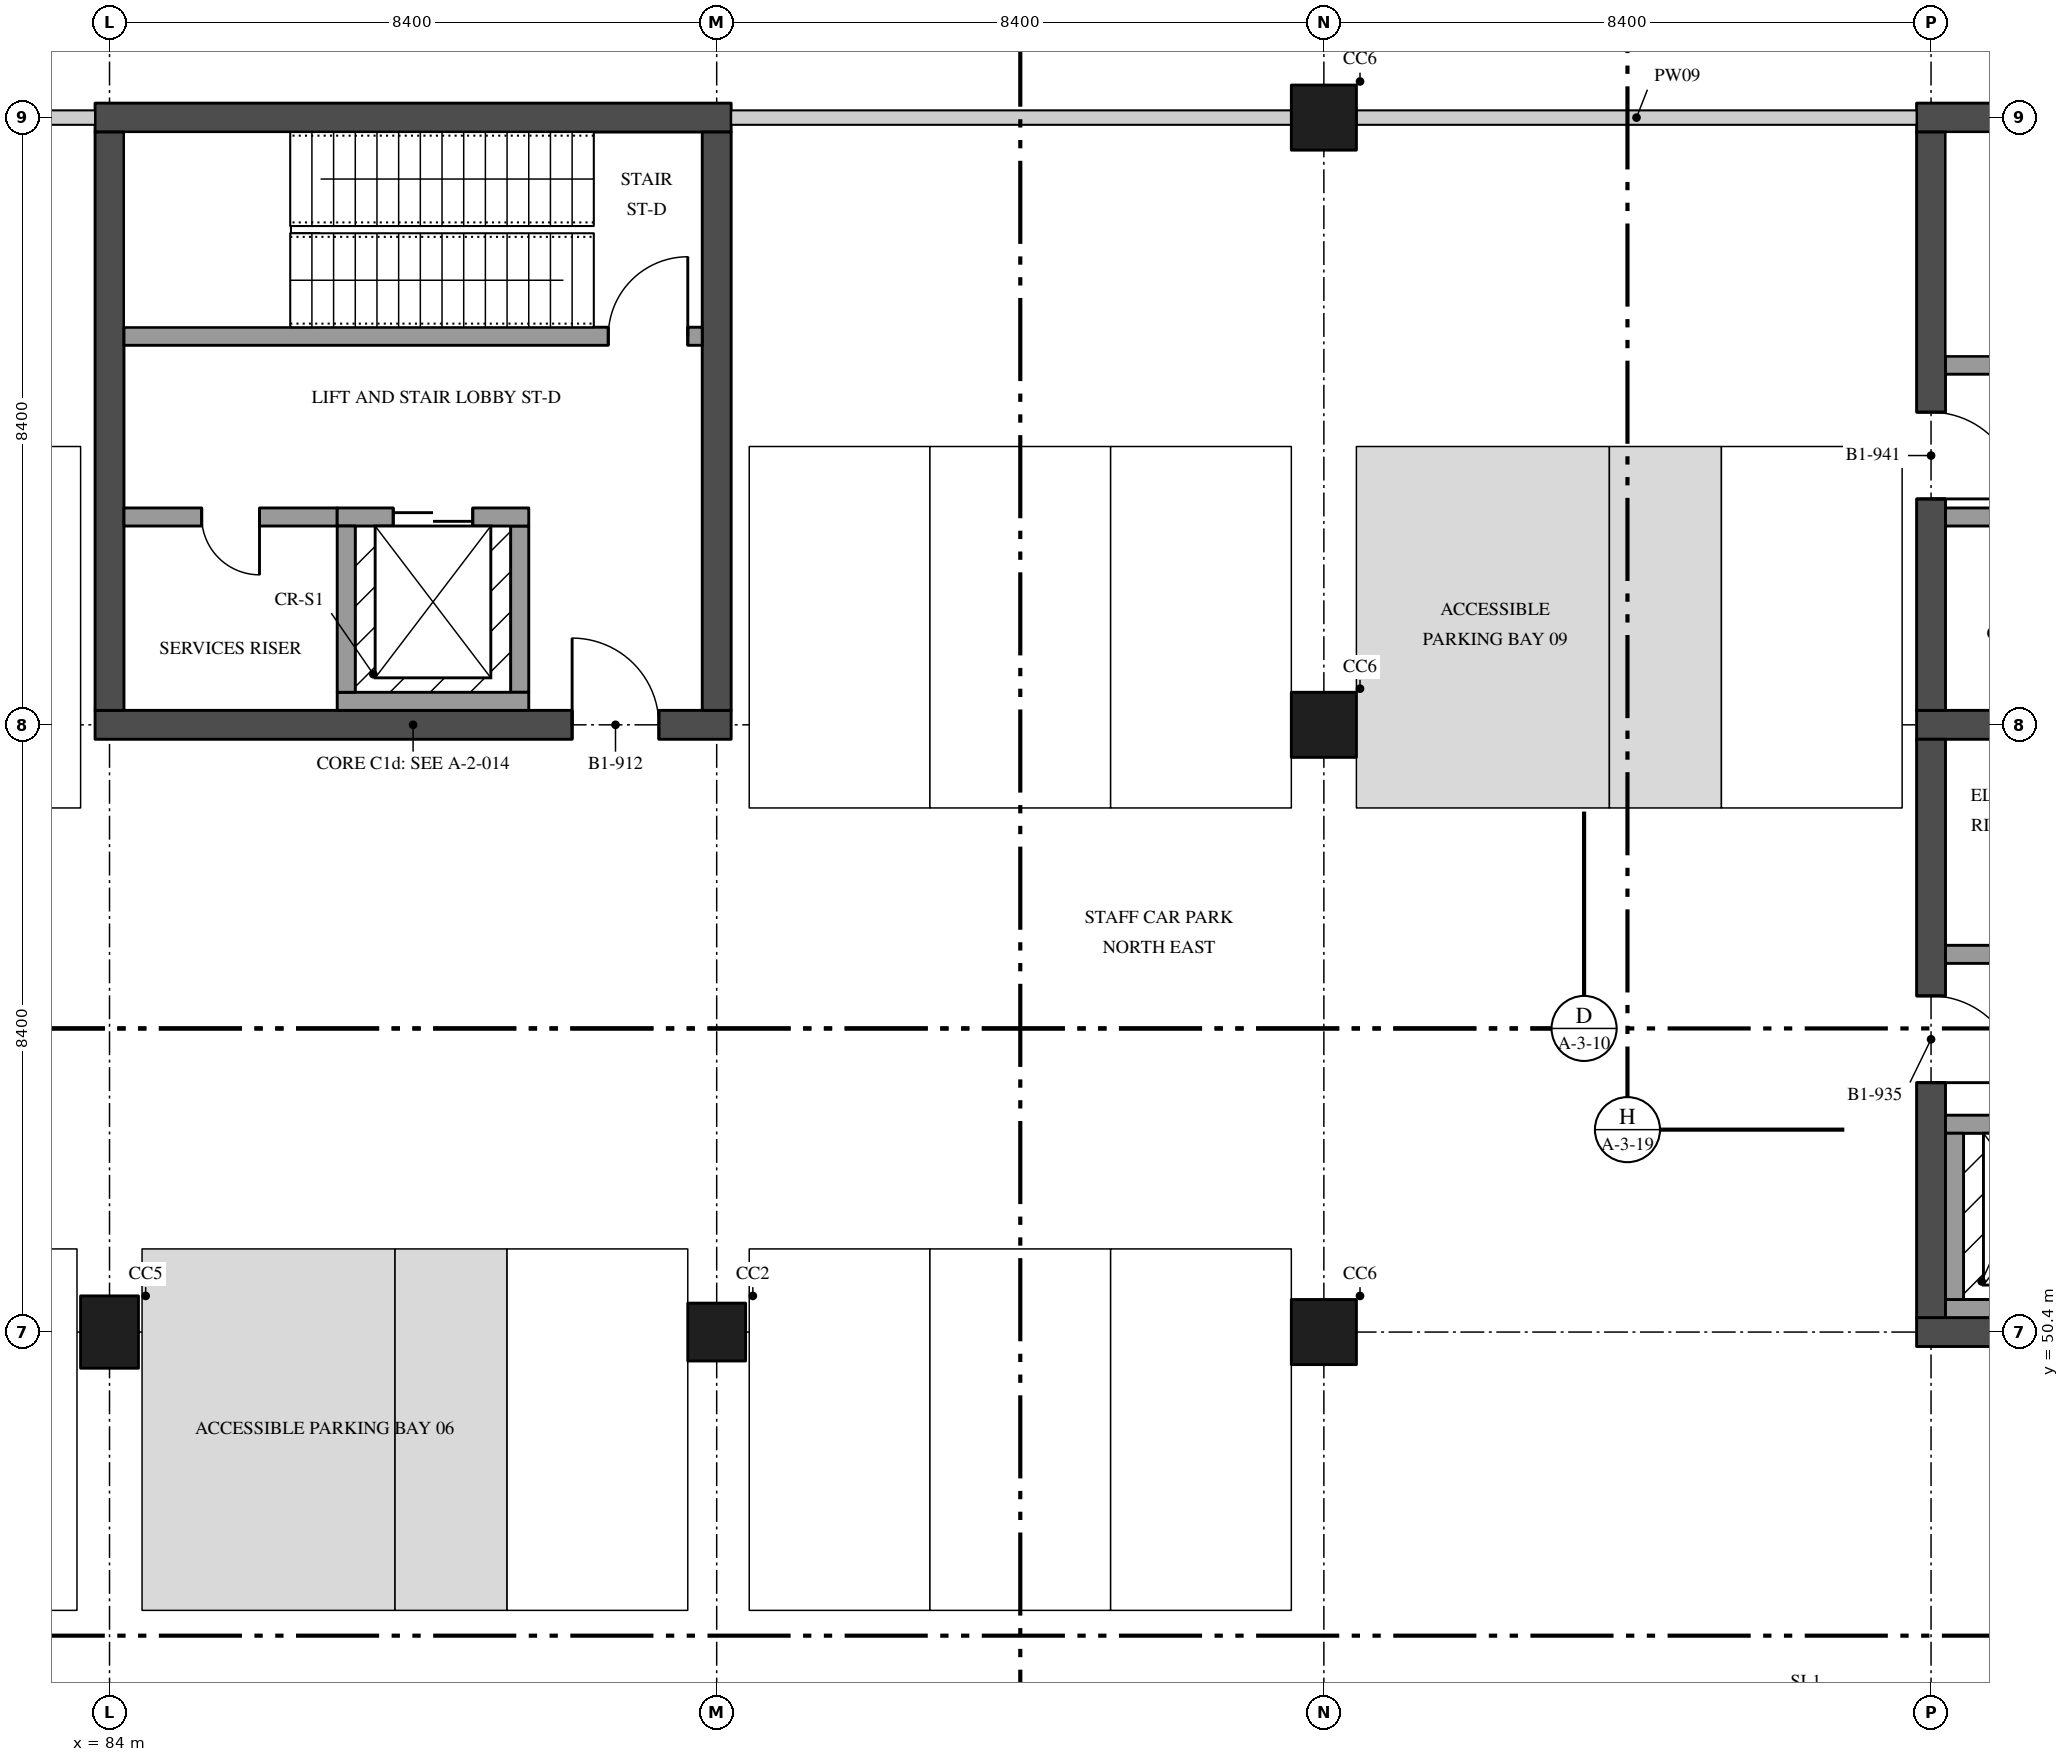
"""IFC4 building model, lengths in metres.
Left out: names, types, materials, properties, quantities, classifications, styles, units other than length and angle.
Written with IfcOpenShell. Run it as: python <this file> out.ifc"""

import sys

from ifc_helpers import new_model, si_unit, direction, frame, frame_2d, origin, origin_2d, place, context, subcontext, project, spatial, rectangle, extrude, element, fill, save


model = new_model("IFC4")
c1 = context("Model", 3, precision=1e-05, world=origin(), true_north=direction((0.0, 1.0)))
c2 = subcontext(c1, "Body", "Model", "MODEL_VIEW")
j1 = project(units=[si_unit("LENGTHUNIT", "METRE"), si_unit("PLANEANGLEUNIT", "RADIAN")], contexts=[c1])
p1 = place(None, origin())
s1 = spatial("IfcSite", under=j1, at=p1, CompositionType="ELEMENT")
p2 = place(p1, origin())
s2 = spatial("IfcBuilding", under=s1, at=p2, CompositionType="ELEMENT")
p3 = place(p2, frame((0.0, 0.0, -4.5)))
s3 = spatial("IfcBuildingStorey", under=s2, at=p3, CompositionType="ELEMENT", Elevation=-4.5)
p4 = place(p3, frame((84.0, 50.4, 0.0), z_axis=(0.0, 0.0, 1.0), x_axis=(1.0, 0.0, 0.0)))
e1 = element("IfcColumn", 1, at=p4, inside=s3, PredefinedType="COLUMN", context=c2, shape_type="SweptSolid", body=[
    extrude(rectangle(XDim=0.8, YDim=1.0, at=origin_2d()), origin(), (0.0, 0.0, 1.0), 4.05),
])
p5 = place(p3, frame((92.4, 50.4, 0.0), z_axis=(0.0, 0.0, 1.0), x_axis=(1.0, 0.0, 0.0)))
e2 = element("IfcColumn", 2, at=p5, inside=s3, PredefinedType="COLUMN", context=c2, shape_type="SweptSolid", body=[
    extrude(rectangle(XDim=0.8, YDim=0.8, at=origin_2d()), origin(), (0.0, 0.0, 1.0), 4.05),
])
for number, where, z_axis, x_axis in (
    (3, (100.8, 50.4, 0.0), (0.0, 0.0, 1.0), (1.0, 0.0, 0.0)),
    (4, (100.8, 58.8, 0.0), (0.0, 0.0, 1.0), (1.0, 0.0, 0.0)),
    (5, (100.8, 67.2, 0.0), (0.0, 0.0, 1.0), (1.0, 0.0, 0.0)),
):
    element("IfcColumn", number, at=place(p3, frame(where, z_axis=z_axis, x_axis=x_axis)), inside=s3, PredefinedType="COLUMN", context=c2, shape_type="SweptSolid", body=[
        extrude(rectangle(XDim=0.9, YDim=0.9, at=origin_2d()), origin(), (0.0, 0.0, 1.0), 4.05),
    ])
p6 = place(p3, frame((83.8, 58.8, 0.0), z_axis=(0.0, 0.0, 1.0), x_axis=(1.0, 0.0, 0.0)))
e6 = element("IfcWall", 6, at=p6, inside=s3, PredefinedType="SHEAR", context=c2, shape_type="SweptSolid", body=[
    extrude(rectangle(XDim=8.8, YDim=0.4, at=frame_2d((4.4, 0.0))), origin(), (0.0, 0.0, 1.0), 4.05),
])
p7 = place(p6, frame((6.6, 0.0, 0.0)))
e7 = element("IfcOpeningElement", 7, at=p7, cuts=e6, PredefinedType="OPENING", context=c2, shape_type="SweptSolid", body=[
    extrude(rectangle(XDim=1.2, YDim=2.1, at=frame_2d((0.6, 1.05))), frame((0.0, 0.21, 0.0), z_axis=(0.0, -1.0, 0.0), x_axis=(1.0, 0.0, 0.0)), (0.0, 0.0, 1.0), 0.42),
])
p8 = place(p3, frame((83.8, 67.2, 0.0), z_axis=(0.0, 0.0, 1.0), x_axis=(1.0, 0.0, 0.0)))
e8 = element("IfcWall", 8, at=p8, inside=s3, PredefinedType="SHEAR", context=c2, shape_type="SweptSolid", body=[
    extrude(rectangle(XDim=8.8, YDim=0.4, at=frame_2d((4.4, 0.0))), origin(), (0.0, 0.0, 1.0), 4.05),
])
for number, where, z_axis, x_axis in (
    (9, (84.0, 59.0, 0.0), (0.0, 0.0, 1.0), (0.0, 1.0, 0.0)),
    (10, (92.4, 59.0, 0.0), (0.0, 0.0, 1.0), (0.0, 1.0, 0.0)),
):
    element("IfcWall", number, at=place(p3, frame(where, z_axis=z_axis, x_axis=x_axis)), inside=s3, PredefinedType="SHEAR", context=c2, shape_type="SweptSolid", body=[
        extrude(rectangle(XDim=8.0, YDim=0.4, at=frame_2d((4.0, 0.0))), origin(), (0.0, 0.0, 1.0), 4.05),
    ])
p9 = place(p3, frame((92.2, 64.175, 0.0), z_axis=(0.0, 0.0, 1.0), x_axis=(-1.0, 0.0, 0.0)))
e11 = element("IfcWall", 11, at=p9, inside=s3, PredefinedType="SOLIDWALL", context=c2, shape_type="SweptSolid", body=[
    extrude(rectangle(XDim=8.0, YDim=0.25, at=frame_2d((4.0, 0.0))), origin(), (0.0, 0.0, 1.0), 4.05),
])
p10 = place(p9, frame((0.2, 0.0, 0.0)))
e12 = element("IfcOpeningElement", 12, at=p10, cuts=e11, PredefinedType="OPENING", context=c2, shape_type="SweptSolid", body=[
    extrude(rectangle(XDim=1.1, YDim=2.1, at=frame_2d((0.55, 1.05))), frame((0.0, 0.135, 0.0), z_axis=(0.0, -1.0, 0.0), x_axis=(1.0, 0.0, 0.0)), (0.0, 0.0, 1.0), 0.27),
])
p11 = place(p3, frame((87.15, 61.675, 0.0), z_axis=(0.0, 0.0, 1.0), x_axis=(-1.0, 0.0, 0.0)))
e13 = element("IfcWall", 13, at=p11, inside=s3, PredefinedType="SOLIDWALL", context=c2, shape_type="SweptSolid", body=[
    extrude(rectangle(XDim=2.95, YDim=0.25, at=frame_2d((1.475, 0.0))), origin(), (0.0, 0.0, 1.0), 4.05),
])
p12 = place(p11, frame((1.075, 0.0, 0.0)))
e14 = element("IfcOpeningElement", 14, at=p12, cuts=e13, PredefinedType="OPENING", context=c2, shape_type="SweptSolid", body=[
    extrude(rectangle(XDim=0.8, YDim=2.1, at=frame_2d((0.4, 1.05))), frame((0.0, 0.135, 0.0), z_axis=(0.0, -1.0, 0.0), x_axis=(1.0, 0.0, 0.0)), (0.0, 0.0, 1.0), 0.27),
])
p13 = place(p3, frame((109.0, 50.4, 0.0), z_axis=(0.0, 0.0, 1.0), x_axis=(1.0, 0.0, 0.0)))
e15 = element("IfcWall", 15, at=p13, inside=s3, PredefinedType="SHEAR", context=c2, shape_type="SweptSolid", body=[
    extrude(rectangle(XDim=8.8, YDim=0.4, at=frame_2d((4.4, 0.0))), origin(), (0.0, 0.0, 1.0), 4.05),
])
p14 = place(p3, frame((109.0, 58.8, 0.0), z_axis=(0.0, 0.0, 1.0), x_axis=(1.0, 0.0, 0.0)))
e16 = element("IfcWall", 16, at=p14, inside=s3, PredefinedType="SHEAR", context=c2, shape_type="SweptSolid", body=[
    extrude(rectangle(XDim=8.8, YDim=0.4, at=frame_2d((4.4, 0.0))), origin(), (0.0, 0.0, 1.0), 4.05),
])
p15 = place(p14, frame((6.65, 0.0, 0.0)))
e17 = element("IfcOpeningElement", 17, at=p15, cuts=e16, PredefinedType="OPENING", context=c2, shape_type="SweptSolid", body=[
    extrude(rectangle(XDim=1.1, YDim=2.1, at=frame_2d((0.55, 1.05))), frame((0.0, 0.21, 0.0), z_axis=(0.0, -1.0, 0.0), x_axis=(1.0, 0.0, 0.0)), (0.0, 0.0, 1.0), 0.42),
])
p16 = place(p3, frame((109.2, 50.6, 0.0), z_axis=(0.0, 0.0, 1.0), x_axis=(0.0, 1.0, 0.0)))
e18 = element("IfcWall", 18, at=p16, inside=s3, PredefinedType="SHEAR", context=c2, shape_type="SweptSolid", body=[
    extrude(rectangle(XDim=8.0, YDim=0.4, at=frame_2d((4.0, 0.0))), origin(), (0.0, 0.0, 1.0), 4.05),
])
p17 = place(p16, frame((3.25, 0.0, 0.0)))
e19 = element("IfcOpeningElement", 19, at=p17, cuts=e18, PredefinedType="OPENING", context=c2, shape_type="SweptSolid", body=[
    extrude(rectangle(XDim=1.2, YDim=2.1, at=frame_2d((0.6, 1.05))), frame((0.0, 0.21, 0.0), z_axis=(0.0, -1.0, 0.0), x_axis=(1.0, 0.0, 0.0)), (0.0, 0.0, 1.0), 0.42),
])
p18 = place(p3, frame((109.4, 55.625, 0.0), z_axis=(0.0, 0.0, 1.0), x_axis=(1.0, 0.0, 0.0)))
e20 = element("IfcWall", 20, at=p18, inside=s3, PredefinedType="SOLIDWALL", context=c2, shape_type="SweptSolid", body=[
    extrude(rectangle(XDim=2.25, YDim=0.25, at=frame_2d((1.125, 0.0))), origin(), (0.0, 0.0, 1.0), 4.05),
])
p19 = place(p18, frame((0.675, 0.0, 0.0)))
e21 = element("IfcOpeningElement", 21, at=p19, cuts=e20, PredefinedType="OPENING", context=c2, shape_type="SweptSolid", body=[
    extrude(rectangle(XDim=0.9, YDim=2.1, at=frame_2d((0.45, 1.05))), frame((0.0, 0.135, 0.0), z_axis=(0.0, -1.0, 0.0), x_axis=(1.0, 0.0, 0.0)), (0.0, 0.0, 1.0), 0.27),
])
p20 = place(p3, frame((109.0, 67.2, 0.0), z_axis=(0.0, 0.0, 1.0), x_axis=(1.0, 0.0, 0.0)))
e22 = element("IfcWall", 22, at=p20, inside=s3, PredefinedType="SHEAR", context=c2, shape_type="SweptSolid", body=[
    extrude(rectangle(XDim=8.8, YDim=0.4, at=frame_2d((4.4, 0.0))), origin(), (0.0, 0.0, 1.0), 4.05),
])
p21 = place(p3, frame((109.2, 59.0, 0.0), z_axis=(0.0, 0.0, 1.0), x_axis=(0.0, 1.0, 0.0)))
e23 = element("IfcWall", 23, at=p21, inside=s3, PredefinedType="SHEAR", context=c2, shape_type="SweptSolid", body=[
    extrude(rectangle(XDim=8.0, YDim=0.4, at=frame_2d((4.0, 0.0))), origin(), (0.0, 0.0, 1.0), 4.05),
])
p22 = place(p21, frame((2.925, 0.0, 0.0)))
e24 = element("IfcOpeningElement", 24, at=p22, cuts=e23, PredefinedType="OPENING", context=c2, shape_type="SweptSolid", body=[
    extrude(rectangle(XDim=1.2, YDim=2.1, at=frame_2d((0.6, 1.05))), frame((0.0, 0.21, 0.0), z_axis=(0.0, -1.0, 0.0), x_axis=(1.0, 0.0, 0.0)), (0.0, 0.0, 1.0), 0.42),
])
p23 = place(p3, frame((117.4, 63.775, 0.0), z_axis=(0.0, 0.0, 1.0), x_axis=(-1.0, 0.0, 0.0)))
e25 = element("IfcWall", 25, at=p23, inside=s3, PredefinedType="SOLIDWALL", context=c2, shape_type="SweptSolid", body=[
    extrude(rectangle(XDim=8.0, YDim=0.25, at=frame_2d((4.0, 0.0))), origin(), (0.0, 0.0, 1.0), 4.05),
])
p24 = place(p23, frame((0.2, 0.0, 0.0)))
e26 = element("IfcOpeningElement", 26, at=p24, cuts=e25, PredefinedType="OPENING", context=c2, shape_type="SweptSolid", body=[
    extrude(rectangle(XDim=1.1, YDim=2.1, at=frame_2d((0.55, 1.05))), frame((0.0, 0.135, 0.0), z_axis=(0.0, -1.0, 0.0), x_axis=(1.0, 0.0, 0.0)), (0.0, 0.0, 1.0), 0.27),
])
p25 = place(p3, frame((114.75, 61.675, 0.0), z_axis=(0.0, 0.0, 1.0), x_axis=(-1.0, 0.0, 0.0)))
e27 = element("IfcWall", 27, at=p25, inside=s3, PredefinedType="SOLIDWALL", context=c2, shape_type="SweptSolid", body=[
    extrude(rectangle(XDim=5.35, YDim=0.25, at=frame_2d((2.675, 0.0))), origin(), (0.0, 0.0, 1.0), 4.05),
])
p26 = place(p25, frame((3.65, 0.0, 0.0)))
e28 = element("IfcOpeningElement", 28, at=p26, cuts=e27, PredefinedType="OPENING", context=c2, shape_type="SweptSolid", body=[
    extrude(rectangle(XDim=0.9, YDim=2.1, at=frame_2d((0.45, 1.05))), frame((0.0, 0.135, 0.0), z_axis=(0.0, -1.0, 0.0), x_axis=(1.0, 0.0, 0.0)), (0.0, 0.0, 1.0), 0.27),
])
p27 = place(p25, frame((0.9, 0.0, 0.0)))
e29 = element("IfcOpeningElement", 29, at=p27, cuts=e27, PredefinedType="OPENING", context=c2, shape_type="SweptSolid", body=[
    extrude(rectangle(XDim=0.8, YDim=2.1, at=frame_2d((0.4, 1.05))), frame((0.0, 0.135, 0.0), z_axis=(0.0, -1.0, 0.0), x_axis=(1.0, 0.0, 0.0)), (0.0, 0.0, 1.0), 0.27),
])
p28 = place(p3, frame((89.675, 59.25, 0.0), z_axis=(0.0, 0.0, 1.0), x_axis=(0.0, 1.0, 0.0)))
e30 = element("IfcWall", 30, at=p28, inside=s3, PredefinedType="SOLIDWALL", context=c2, shape_type="SweptSolid", body=[
    extrude(rectangle(XDim=2.3, YDim=0.25, at=frame_2d((1.15, 0.0))), origin(), (0.0, 0.0, 1.0), 4.05),
])
p29 = place(p3, frame((87.15, 61.675, 0.0), z_axis=(0.0, 0.0, 1.0), x_axis=(1.0, 0.0, 0.0)))
e31 = element("IfcWall", 31, at=p29, inside=s3, PredefinedType="SOLIDWALL", context=c2, shape_type="SweptSolid", body=[
    extrude(rectangle(XDim=2.65, YDim=0.25, at=frame_2d((1.325, 0.0))), origin(), (0.0, 0.0, 1.0), 4.05),
])
p30 = place(p29, frame((0.775, 0.0, 0.0)))
e32 = element("IfcOpeningElement", 32, at=p30, cuts=e31, PredefinedType="OPENING", context=c2, shape_type="SweptSolid", body=[
    extrude(rectangle(XDim=1.1, YDim=2.1, at=frame_2d((0.55, 1.05))), frame((0.0, 0.135, 0.0), z_axis=(0.0, -1.0, 0.0), x_axis=(1.0, 0.0, 0.0)), (0.0, 0.0, 1.0), 0.27),
])
p31 = place(p3, frame((87.15, 59.125, 0.0), z_axis=(0.0, 0.0, 1.0), x_axis=(1.0, 0.0, 0.0)))
e33 = element("IfcWall", 33, at=p31, inside=s3, PredefinedType="SOLIDWALL", context=c2, shape_type="SweptSolid", body=[
    extrude(rectangle(XDim=2.65, YDim=0.25, at=frame_2d((1.325, 0.0))), origin(), (0.0, 0.0, 1.0), 4.05),
])
p32 = place(p3, frame((87.275, 59.25, 0.0), z_axis=(0.0, 0.0, 1.0), x_axis=(0.0, 1.0, 0.0)))
e34 = element("IfcWall", 34, at=p32, inside=s3, PredefinedType="SOLIDWALL", context=c2, shape_type="SweptSolid", body=[
    extrude(rectangle(XDim=2.3, YDim=0.25, at=frame_2d((1.15, 0.0))), origin(), (0.0, 0.0, 1.0), 4.05),
])
p33 = place(p3, frame((109.4, 53.275, 0.0), z_axis=(0.0, 0.0, 1.0), x_axis=(1.0, 0.0, 0.0)))
e35 = element("IfcWall", 35, at=p33, inside=s3, PredefinedType="SOLIDWALL", context=c2, shape_type="SweptSolid", body=[
    extrude(rectangle(XDim=2.65, YDim=0.25, at=frame_2d((1.325, 0.0))), origin(), (0.0, 0.0, 1.0), 4.05),
])
p34 = place(p33, frame((0.775, 0.0, 0.0)))
e36 = element("IfcOpeningElement", 36, at=p34, cuts=e35, PredefinedType="OPENING", context=c2, shape_type="SweptSolid", body=[
    extrude(rectangle(XDim=1.1, YDim=2.1, at=frame_2d((0.55, 1.05))), frame((0.0, 0.135, 0.0), z_axis=(0.0, -1.0, 0.0), x_axis=(1.0, 0.0, 0.0)), (0.0, 0.0, 1.0), 0.27),
])
p35 = place(p3, frame((109.4, 50.725, 0.0), z_axis=(0.0, 0.0, 1.0), x_axis=(1.0, 0.0, 0.0)))
e37 = element("IfcWall", 37, at=p35, inside=s3, PredefinedType="SOLIDWALL", context=c2, shape_type="SweptSolid", body=[
    extrude(rectangle(XDim=2.65, YDim=0.25, at=frame_2d((1.325, 0.0))), origin(), (0.0, 0.0, 1.0), 4.05),
])
p36 = place(p3, frame((109.525, 50.85, 0.0), z_axis=(0.0, 0.0, 1.0), x_axis=(0.0, 1.0, 0.0)))
e38 = element("IfcWall", 38, at=p36, inside=s3, PredefinedType="SOLIDWALL", context=c2, shape_type="SweptSolid", body=[
    extrude(rectangle(XDim=2.3, YDim=0.25, at=frame_2d((1.15, 0.0))), origin(), (0.0, 0.0, 1.0), 4.05),
])
for number, where, z_axis, x_axis in (
    (39, (92.6, 67.2, 0.0), (0.0, 0.0, 1.0), (1.0, 0.0, 0.0)),
    (40, (101.25, 67.2, 0.0), (0.0, 0.0, 1.0), (1.0, 0.0, 0.0)),
):
    element("IfcWall", number, at=place(p3, frame(where, z_axis=z_axis, x_axis=x_axis)), inside=s3, PredefinedType="PARTITIONING", context=c2, shape_type="SweptSolid", body=[
        extrude(rectangle(XDim=7.75, YDim=0.2, at=frame_2d((3.875, 0.0))), origin(), (0.0, 0.0, 1.0), 4.05),
    ])
p37 = place(p3, frame((76.0, 67.2, 0.0), z_axis=(0.0, 0.0, 1.0), x_axis=(1.0, 0.0, 0.0)))
e41 = element("IfcWall", 41, at=p37, inside=s3, PredefinedType="PARTITIONING", context=c2, shape_type="SweptSolid", body=[
    extrude(rectangle(XDim=7.8, YDim=0.2, at=frame_2d((3.9, 0.0))), origin(), (0.0, 0.0, 1.0), 4.05),
])
p38 = place(p37, frame((3.6, 0.0, 0.0)))
e42 = element("IfcOpeningElement", 42, at=p38, cuts=e41, PredefinedType="OPENING", context=c2, shape_type="SweptSolid", body=[
    extrude(rectangle(XDim=1.0, YDim=2.1, at=frame_2d((0.5, 1.05))), frame((0.0, 0.11, 0.0), z_axis=(0.0, -1.0, 0.0), x_axis=(1.0, 0.0, 0.0)), (0.0, 0.0, 1.0), 0.22),
])
p39 = place(p7, origin())
e43 = element("IfcDoor", 43, at=p39, inside=s3, OperationType="SINGLE_SWING_RIGHT", PredefinedType="DOOR", context=c2, shape_type="SweptSolid", body=[
    extrude(rectangle(XDim=1.2, YDim=2.1, at=frame_2d((0.6, 1.05))), frame((0.0, 0.035, 0.0), z_axis=(0.0, -1.0, 0.0), x_axis=(1.0, 0.0, 0.0)), (0.0, 0.0, 1.0), 0.07),
])
fill(e7, e43)
p40 = place(p12, origin())
e44 = element("IfcDoor", 44, at=p40, inside=s3, OperationType="SINGLE_SWING_RIGHT", PredefinedType="DOOR", context=c2, shape_type="SweptSolid", body=[
    extrude(rectangle(XDim=0.8, YDim=2.1, at=frame_2d((0.4, 1.05))), frame((0.0, 0.035, 0.0), z_axis=(0.0, -1.0, 0.0), x_axis=(1.0, 0.0, 0.0)), (0.0, 0.0, 1.0), 0.07),
])
fill(e14, e44)
p41 = place(p10, frame((1.1, 0.0, 0.0), z_axis=(0.0, 0.0, 1.0), x_axis=(-1.0, 0.0, 0.0)))
e45 = element("IfcDoor", 45, at=p41, inside=s3, OperationType="SINGLE_SWING_LEFT", PredefinedType="DOOR", context=c2, shape_type="SweptSolid", body=[
    extrude(rectangle(XDim=1.1, YDim=2.1, at=frame_2d((0.55, 1.05))), frame((0.0, 0.035, 0.0), z_axis=(0.0, -1.0, 0.0), x_axis=(1.0, 0.0, 0.0)), (0.0, 0.0, 1.0), 0.07),
])
fill(e12, e45)
p42 = place(p17, frame((1.2, 0.0, 0.0), z_axis=(0.0, 0.0, 1.0), x_axis=(-1.0, 0.0, 0.0)))
e46 = element("IfcDoor", 46, at=p42, inside=s3, OperationType="SINGLE_SWING_LEFT", PredefinedType="DOOR", context=c2, shape_type="SweptSolid", body=[
    extrude(rectangle(XDim=1.2, YDim=2.1, at=frame_2d((0.6, 1.05))), frame((0.0, 0.035, 0.0), z_axis=(0.0, -1.0, 0.0), x_axis=(1.0, 0.0, 0.0)), (0.0, 0.0, 1.0), 0.07),
])
fill(e19, e46)
p43 = place(p22, frame((1.2, 0.0, 0.0), z_axis=(0.0, 0.0, 1.0), x_axis=(-1.0, 0.0, 0.0)))
e47 = element("IfcDoor", 47, at=p43, inside=s3, OperationType="SINGLE_SWING_LEFT", PredefinedType="DOOR", context=c2, shape_type="SweptSolid", body=[
    extrude(rectangle(XDim=1.2, YDim=2.1, at=frame_2d((0.6, 1.05))), frame((0.0, 0.035, 0.0), z_axis=(0.0, -1.0, 0.0), x_axis=(1.0, 0.0, 0.0)), (0.0, 0.0, 1.0), 0.07),
])
fill(e24, e47)
p44 = place(p30, origin())
e48 = element("IfcDoor", 48, at=p44, inside=s3, OperationType="DOUBLE_DOOR_SLIDING", PredefinedType="DOOR", context=c2, shape_type="SweptSolid", body=[
    extrude(rectangle(XDim=1.1, YDim=2.1, at=frame_2d((0.55, 1.05))), frame((0.0, 0.04, 0.0), z_axis=(0.0, -1.0, 0.0), x_axis=(1.0, 0.0, 0.0)), (0.0, 0.0, 1.0), 0.08),
])
fill(e32, e48)
save(model, sys.argv[1])
